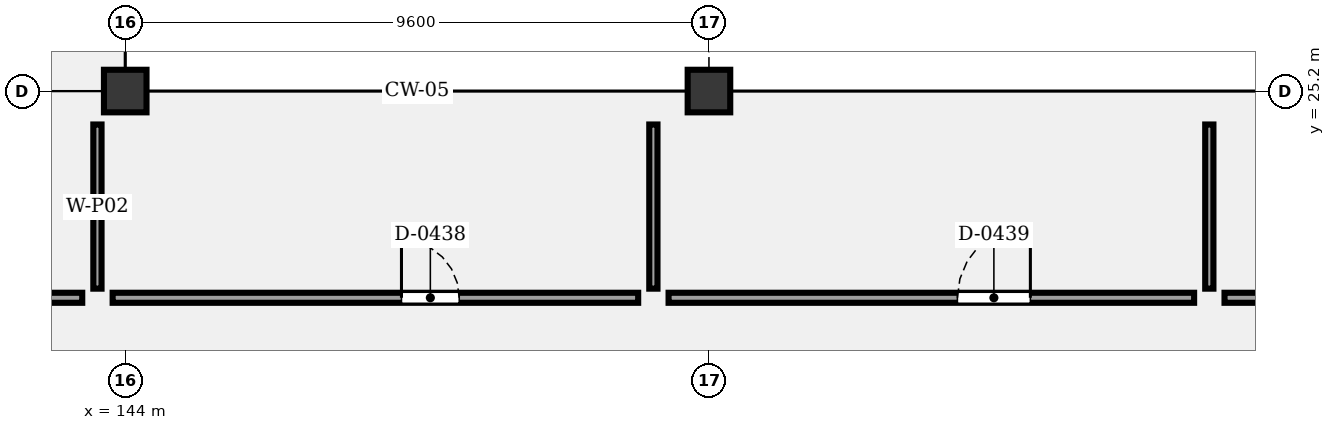
"""IFC4 building model, lengths in metres.
Left out: names, types, materials, properties, quantities, classifications, styles, units other than length and angle.
Written with IfcOpenShell. Run it as: python <this file> out.ifc"""

import sys

from ifc_helpers import new_model, si_unit, direction, frame, frame_2d, origin, origin_2d, place, context, subcontext, project, spatial, rectangle, extrude, element, fill, save


model = new_model("IFC4")
c1 = context("Model", 3, precision=1e-05, world=origin(), true_north=direction((0.0, 1.0)))
c2 = subcontext(c1, "Body", "Model", "MODEL_VIEW")
j1 = project(units=[si_unit("LENGTHUNIT", "METRE"), si_unit("PLANEANGLEUNIT", "RADIAN")], contexts=[c1])
p1 = place(None, origin())
s1 = spatial("IfcSite", under=j1, at=p1, CompositionType="ELEMENT")
p2 = place(p1, origin())
s2 = spatial("IfcBuilding", under=s1, at=p2, CompositionType="ELEMENT")
p3 = place(p2, frame((0.0, 0.0, 17.8)))
s3 = spatial("IfcBuildingStorey", under=s2, at=p3, CompositionType="ELEMENT", Elevation=17.8)
for number, where, z_axis, x_axis in (
    (1, (144.0, 25.2, 0.0), (0.0, 0.0, 1.0), (1.0, 0.0, 0.0)),
    (2, (153.6, 25.2, 0.0), (0.0, 0.0, 1.0), (1.0, 0.0, 0.0)),
):
    element("IfcColumn", number, at=place(p3, frame(where, z_axis=z_axis, x_axis=x_axis)), inside=s3, PredefinedType="COLUMN", context=c2, shape_type="SweptSolid", body=[
        extrude(rectangle(XDim=0.7, YDim=0.7, at=origin_2d()), origin(), (0.0, 0.0, 1.0), 4.2),
    ])
p4 = place(p3, frame((134.65, 21.8, 0.0), z_axis=(0.0, 0.0, 1.0), x_axis=(1.0, 0.0, 0.0)))
e3 = element("IfcWall", 3, at=p4, inside=s3, PredefinedType="PARTITIONING", context=c2, shape_type="SweptSolid", body=[
    extrude(rectangle(XDim=8.643, YDim=0.165, at=frame_2d((4.322, 0.0))), origin(), (0.0, 0.0, 1.0), 3.3),
])
p5 = place(p4, frame((4.75, 0.0, 0.0)))
e4 = element("IfcOpeningElement", 4, at=p5, cuts=e3, PredefinedType="OPENING", context=c2, shape_type="SweptSolid", body=[
    extrude(rectangle(XDim=1.2, YDim=2.4, at=frame_2d((0.6, 1.2))), frame((0.0, 0.093, 0.0), z_axis=(0.0, -1.0, 0.0), x_axis=(1.0, 0.0, 0.0)), (0.0, 0.0, 1.0), 0.185),
])
p6 = place(p3, frame((143.793, 21.8, 0.0), z_axis=(0.0, 0.0, 1.0), x_axis=(1.0, 0.0, 0.0)))
e5 = element("IfcWall", 5, at=p6, inside=s3, PredefinedType="PARTITIONING", context=c2, shape_type="SweptSolid", body=[
    extrude(rectangle(XDim=8.643, YDim=0.165, at=frame_2d((4.322, 0.0))), origin(), (0.0, 0.0, 1.0), 3.3),
])
p7 = place(p6, frame((4.75, 0.0, 0.0)))
e6 = element("IfcOpeningElement", 6, at=p7, cuts=e5, PredefinedType="OPENING", context=c2, shape_type="SweptSolid", body=[
    extrude(rectangle(XDim=0.95, YDim=2.1, at=frame_2d((0.475, 1.05))), frame((0.0, 0.093, 0.0), z_axis=(0.0, -1.0, 0.0), x_axis=(1.0, 0.0, 0.0)), (0.0, 0.0, 1.0), 0.185),
])
p8 = place(p3, frame((143.543, 21.95, 0.0), z_axis=(0.0, 0.0, 1.0), x_axis=(0.0, 1.0, 0.0)))
e7 = element("IfcWall", 7, at=p8, inside=s3, PredefinedType="PARTITIONING", context=c2, shape_type="SweptSolid", body=[
    extrude(rectangle(XDim=2.7, YDim=0.135, at=frame_2d((1.35, 0.0))), origin(), (0.0, 0.0, 1.0), 3.3),
])
p9 = place(p3, frame((152.936, 21.8, 0.0), z_axis=(0.0, 0.0, 1.0), x_axis=(1.0, 0.0, 0.0)))
e8 = element("IfcWall", 8, at=p9, inside=s3, PredefinedType="PARTITIONING", context=c2, shape_type="SweptSolid", body=[
    extrude(rectangle(XDim=8.643, YDim=0.165, at=frame_2d((4.322, 0.0))), origin(), (0.0, 0.0, 1.0), 3.3),
])
p10 = place(p9, frame((4.75, 0.0, 0.0)))
e9 = element("IfcOpeningElement", 9, at=p10, cuts=e8, PredefinedType="OPENING", context=c2, shape_type="SweptSolid", body=[
    extrude(rectangle(XDim=1.2, YDim=2.4, at=frame_2d((0.6, 1.2))), frame((0.0, 0.093, 0.0), z_axis=(0.0, -1.0, 0.0), x_axis=(1.0, 0.0, 0.0)), (0.0, 0.0, 1.0), 0.185),
])
p11 = place(p3, frame((152.686, 21.95, 0.0), z_axis=(0.0, 0.0, 1.0), x_axis=(0.0, 1.0, 0.0)))
e10 = element("IfcWall", 10, at=p11, inside=s3, PredefinedType="PARTITIONING", context=c2, shape_type="SweptSolid", body=[
    extrude(rectangle(XDim=2.7, YDim=0.135, at=frame_2d((1.35, 0.0))), origin(), (0.0, 0.0, 1.0), 3.3),
])
p12 = place(p3, frame((162.079, 21.8, 0.0), z_axis=(0.0, 0.0, 1.0), x_axis=(1.0, 0.0, 0.0)))
e11 = element("IfcWall", 11, at=p12, inside=s3, PredefinedType="PARTITIONING", context=c2, shape_type="SweptSolid", body=[
    extrude(rectangle(XDim=8.643, YDim=0.165, at=frame_2d((4.321, 0.0))), origin(), (0.0, 0.0, 1.0), 3.3),
])
p13 = place(p12, frame((5.45, 0.0, 0.0)))
e12 = element("IfcOpeningElement", 12, at=p13, cuts=e11, PredefinedType="OPENING", context=c2, shape_type="SweptSolid", body=[
    extrude(rectangle(XDim=0.95, YDim=2.1, at=frame_2d((0.475, 1.05))), frame((0.0, 0.093, 0.0), z_axis=(0.0, -1.0, 0.0), x_axis=(1.0, 0.0, 0.0)), (0.0, 0.0, 1.0), 0.185),
])
p14 = place(p3, frame((161.829, 21.95, 0.0), z_axis=(0.0, 0.0, 1.0), x_axis=(0.0, 1.0, 0.0)))
e13 = element("IfcWall", 13, at=p14, inside=s3, PredefinedType="PARTITIONING", context=c2, shape_type="SweptSolid", body=[
    extrude(rectangle(XDim=2.7, YDim=0.135, at=frame_2d((1.35, 0.0))), origin(), (0.0, 0.0, 1.0), 3.3),
])
p15 = place(p7, origin())
e14 = element("IfcDoor", 14, at=p15, inside=s3, OperationType="SINGLE_SWING_LEFT", PredefinedType="DOOR", context=c2, shape_type="SweptSolid", body=[
    extrude(rectangle(XDim=0.95, YDim=2.1, at=frame_2d((0.475, 1.05))), frame((0.0, 0.025, 0.0), z_axis=(0.0, -1.0, 0.0), x_axis=(1.0, 0.0, 0.0)), (0.0, 0.0, 1.0), 0.05),
])
fill(e6, e14)
p16 = place(p10, origin())
e15 = element("IfcDoor", 15, at=p16, inside=s3, OperationType="SINGLE_SWING_RIGHT", PredefinedType="DOOR", context=c2, shape_type="SweptSolid", body=[
    extrude(rectangle(XDim=1.2, YDim=2.4, at=frame_2d((0.6, 1.2))), frame((0.0, 0.025, 0.0), z_axis=(0.0, -1.0, 0.0), x_axis=(1.0, 0.0, 0.0)), (0.0, 0.0, 1.0), 0.05),
])
fill(e9, e15)
save(model, sys.argv[1])
